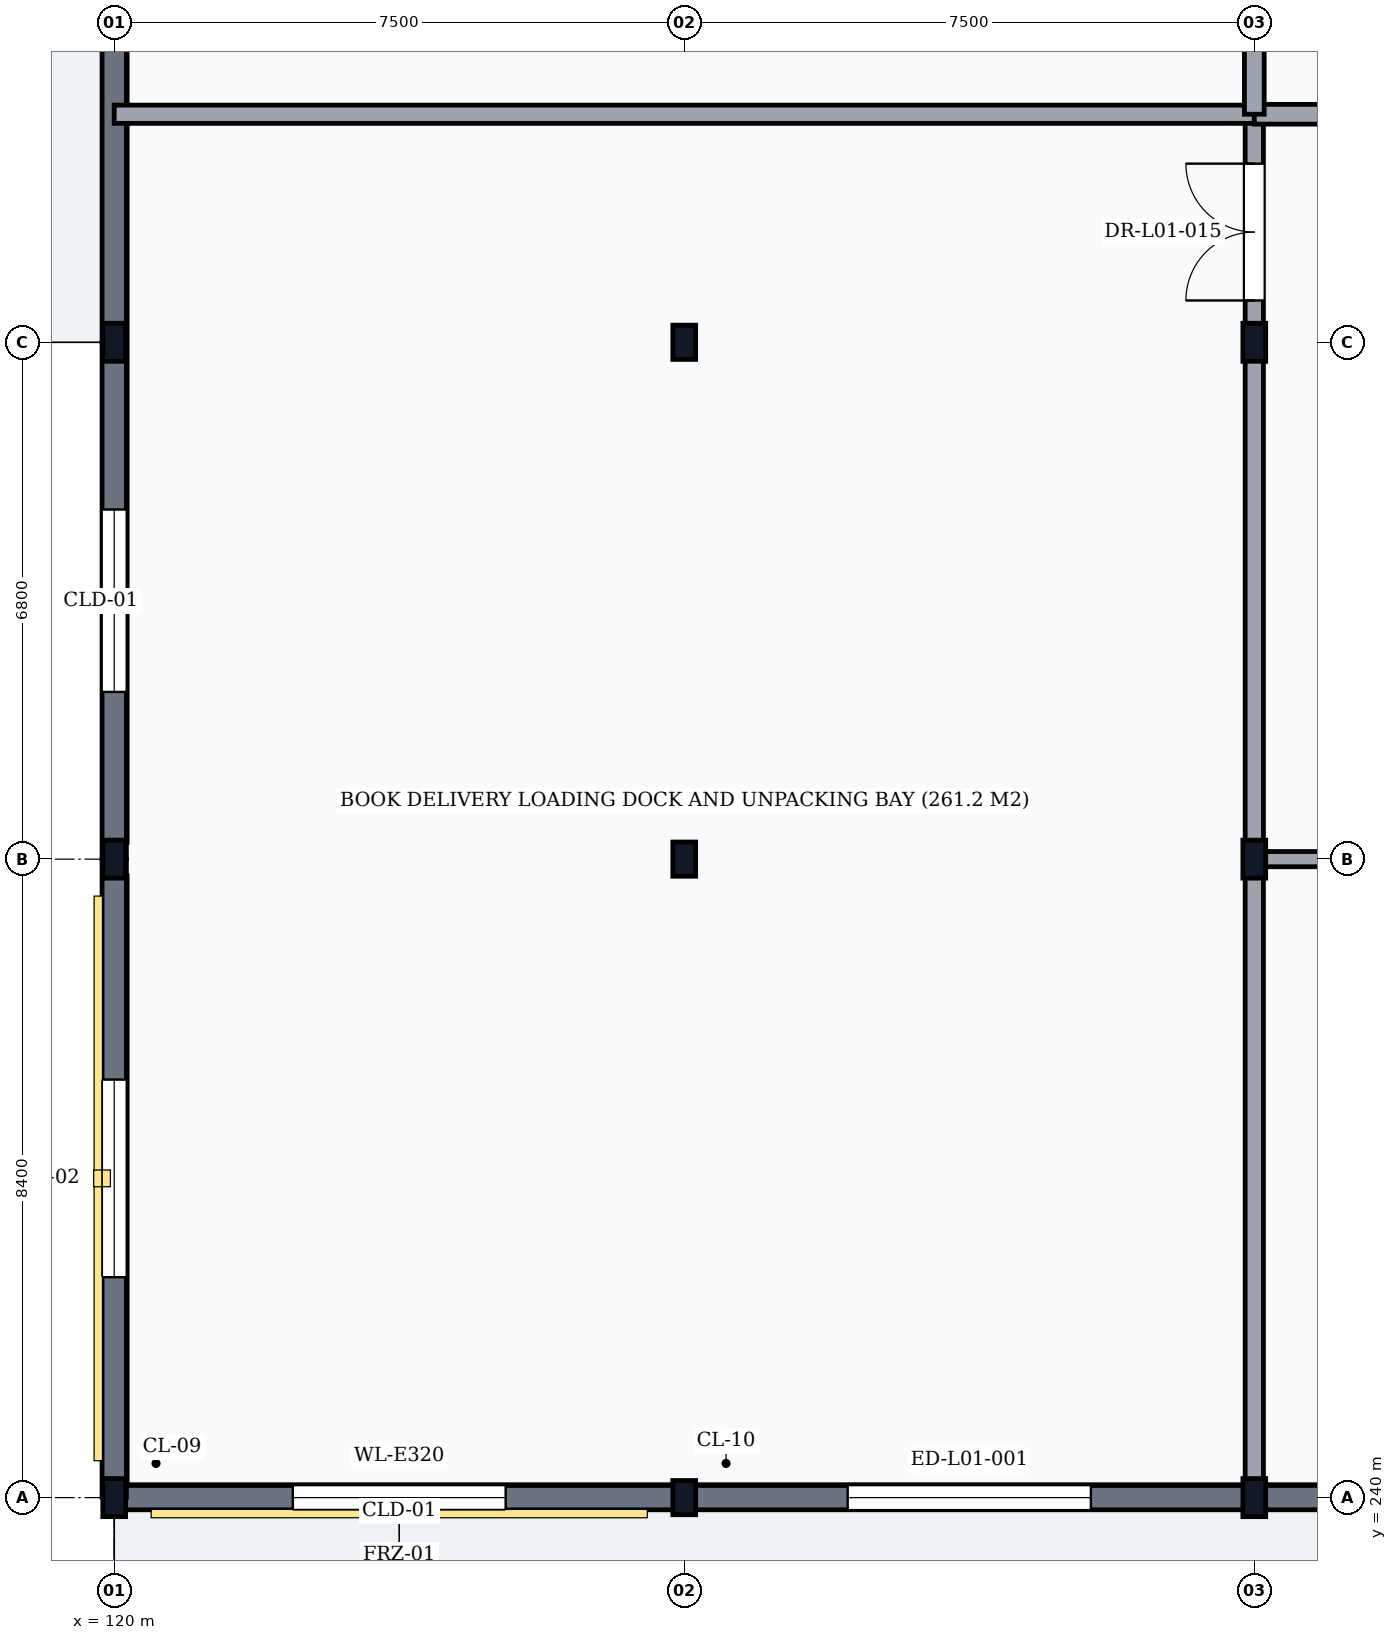
"""IFC4 building model, lengths in metres.
Left out: names, types, materials, properties, quantities, classifications, styles, units other than length and angle.
Written with IfcOpenShell. Run it as: python <this file> out.ifc"""

import sys

from ifc_helpers import new_model, si_unit, direction, frame, frame_2d, origin, origin_2d, place, context, subcontext, project, spatial, rectangle, i_section, extrude, element, fill, save


model = new_model("IFC4")
c1 = context("Model", 3, precision=1e-05, world=origin(), true_north=direction((0.0, 1.0)))
c2 = subcontext(c1, "Body", "Model", "MODEL_VIEW")
j1 = project(units=[si_unit("LENGTHUNIT", "METRE"), si_unit("PLANEANGLEUNIT", "RADIAN")], contexts=[c1])
p1 = place(None, origin())
s1 = spatial("IfcSite", under=j1, at=p1, CompositionType="ELEMENT")
p2 = place(p1, origin())
s2 = spatial("IfcBuilding", under=s1, at=p2, CompositionType="ELEMENT")
p3 = place(p2, origin())
s3 = spatial("IfcBuildingStorey", under=s2, at=p3, CompositionType="ELEMENT", Elevation=0.0)
for number, where, z_axis, x_axis in (
    (1, (120.0, 240.0, 0.0), (0.0, 0.0, 1.0), (1.0, 0.0, 0.0)),
    (2, (120.0, 248.4, 0.0), (0.0, 0.0, 1.0), (1.0, 0.0, 0.0)),
    (3, (120.0, 255.2, 0.0), (0.0, 0.0, 1.0), (1.0, 0.0, 0.0)),
):
    element("IfcColumn", number, at=place(p3, frame(where, z_axis=z_axis, x_axis=x_axis)), inside=s3, PredefinedType="COLUMN", context=c2, shape_type="SweptSolid", body=[
        extrude(i_section(OverallWidth=0.3, OverallDepth=0.5, WebThickness=0.014, FlangeThickness=0.028, FilletRadius=0.027, at=origin_2d()), origin(), (0.0, 0.0, 1.0), 5.4),
    ])
for number, where, z_axis, x_axis in (
    (4, (127.5, 240.0, 0.0), (0.0, 0.0, 1.0), (1.0, 0.0, 0.0)),
    (5, (127.5, 248.4, 0.0), (0.0, 0.0, 1.0), (1.0, 0.0, 0.0)),
    (6, (127.5, 255.2, 0.0), (0.0, 0.0, 1.0), (1.0, 0.0, 0.0)),
):
    element("IfcColumn", number, at=place(p3, frame(where, z_axis=z_axis, x_axis=x_axis)), inside=s3, PredefinedType="COLUMN", context=c2, shape_type="SweptSolid", body=[
        extrude(i_section(OverallWidth=0.3, OverallDepth=0.45, WebThickness=0.014, FlangeThickness=0.026, FilletRadius=0.027, at=origin_2d()), origin(), (0.0, 0.0, 1.0), 5.4),
    ])
for number, where, z_axis, x_axis in (
    (7, (135.0, 240.0, 0.0), (0.0, 0.0, 1.0), (1.0, 0.0, 0.0)),
    (8, (135.0, 248.4, 0.0), (0.0, 0.0, 1.0), (1.0, 0.0, 0.0)),
    (9, (135.0, 255.2, 0.0), (0.0, 0.0, 1.0), (1.0, 0.0, 0.0)),
):
    element("IfcColumn", number, at=place(p3, frame(where, z_axis=z_axis, x_axis=x_axis)), inside=s3, PredefinedType="COLUMN", context=c2, shape_type="SweptSolid", body=[
        extrude(i_section(OverallWidth=0.3, OverallDepth=0.5, WebThickness=0.014, FlangeThickness=0.028, FilletRadius=0.027, at=origin_2d()), origin(), (0.0, 0.0, 1.0), 5.4),
    ])
p4 = place(p3, frame((120.006, 240.0, 0.0), z_axis=(0.0, 0.0, 1.0), x_axis=(1.0, 0.0, 0.0)))
e10 = element("IfcWall", 10, at=p4, inside=s3, PredefinedType="SOLIDWALL", context=c2, shape_type="SweptSolid", body=[
    extrude(rectangle(XDim=7.488, YDim=0.32, at=frame_2d((3.744, 0.0))), origin(), (0.0, 0.0, 1.0), 4.878),
])
p5 = place(p4, frame((2.344, 0.0, 0.95)))
e11 = element("IfcOpeningElement", 11, at=p5, cuts=e10, PredefinedType="OPENING", context=c2, shape_type="SweptSolid", body=[
    extrude(rectangle(XDim=2.8, YDim=3.2, at=frame_2d((1.4, 1.6))), frame((0.0, 0.175, 0.0), z_axis=(0.0, -1.0, 0.0), x_axis=(1.0, 0.0, 0.0)), (0.0, 0.0, 1.0), 0.35),
])
p6 = place(p3, frame((127.506, 240.0, 0.0), z_axis=(0.0, 0.0, 1.0), x_axis=(1.0, 0.0, 0.0)))
e12 = element("IfcWall", 12, at=p6, inside=s3, PredefinedType="SOLIDWALL", context=c2, shape_type="SweptSolid", body=[
    extrude(rectangle(XDim=7.488, YDim=0.32, at=frame_2d((3.744, 0.0))), origin(), (0.0, 0.0, 1.0), 4.878),
])
p7 = place(p6, frame((2.144, 0.0, 0.0)))
e13 = element("IfcOpeningElement", 13, at=p7, cuts=e12, PredefinedType="OPENING", context=c2, shape_type="SweptSolid", body=[
    extrude(rectangle(XDim=3.2, YDim=3.0, at=frame_2d((1.6, 1.5))), frame((0.0, 0.175, 0.0), z_axis=(0.0, -1.0, 0.0), x_axis=(1.0, 0.0, 0.0)), (0.0, 0.0, 1.0), 0.35),
])
p8 = place(p3, frame((135.006, 240.0, 0.0), z_axis=(0.0, 0.0, 1.0), x_axis=(1.0, 0.0, 0.0)))
e14 = element("IfcWall", 14, at=p8, inside=s3, PredefinedType="SOLIDWALL", context=c2, shape_type="SweptSolid", body=[
    extrude(rectangle(XDim=7.488, YDim=0.32, at=frame_2d((3.744, 0.0))), origin(), (0.0, 0.0, 1.0), 4.878),
])
p9 = place(p8, frame((2.544, 0.0, 0.95)))
e15 = element("IfcOpeningElement", 15, at=p9, cuts=e14, PredefinedType="OPENING", context=c2, shape_type="SweptSolid", body=[
    extrude(rectangle(XDim=2.4, YDim=2.8, at=frame_2d((1.2, 1.4))), frame((0.0, 0.175, 0.0), z_axis=(0.0, -1.0, 0.0), x_axis=(1.0, 0.0, 0.0)), (0.0, 0.0, 1.0), 0.35),
])
p10 = place(p3, frame((120.0, 240.006, 0.0), z_axis=(0.0, 0.0, 1.0), x_axis=(0.0, 1.0, 0.0)))
e16 = element("IfcWall", 16, at=p10, inside=s3, PredefinedType="SOLIDWALL", context=c2, shape_type="SweptSolid", body=[
    extrude(rectangle(XDim=8.388, YDim=0.32, at=frame_2d((4.194, 0.0))), origin(), (0.0, 0.0, 1.0), 4.838),
])
p11 = place(p10, frame((2.894, 0.0, 0.95)))
e17 = element("IfcOpeningElement", 17, at=p11, cuts=e16, PredefinedType="OPENING", context=c2, shape_type="SweptSolid", body=[
    extrude(rectangle(XDim=2.6, YDim=3.0, at=frame_2d((1.3, 1.5))), frame((0.0, 0.175, 0.0), z_axis=(0.0, -1.0, 0.0), x_axis=(1.0, 0.0, 0.0)), (0.0, 0.0, 1.0), 0.35),
])
p12 = place(p3, frame((120.0, 248.406, 0.0), z_axis=(0.0, 0.0, 1.0), x_axis=(0.0, 1.0, 0.0)))
e18 = element("IfcWall", 18, at=p12, inside=s3, PredefinedType="SOLIDWALL", context=c2, shape_type="SweptSolid", body=[
    extrude(rectangle(XDim=6.788, YDim=0.32, at=frame_2d((3.394, 0.0))), origin(), (0.0, 0.0, 1.0), 4.918),
])
p13 = place(p12, frame((2.194, 0.0, 0.95)))
e19 = element("IfcOpeningElement", 19, at=p13, cuts=e18, PredefinedType="OPENING", context=c2, shape_type="SweptSolid", body=[
    extrude(rectangle(XDim=2.4, YDim=2.8, at=frame_2d((1.2, 1.4))), frame((0.0, 0.175, 0.0), z_axis=(0.0, -1.0, 0.0), x_axis=(1.0, 0.0, 0.0)), (0.0, 0.0, 1.0), 0.35),
])
p14 = place(p3, frame((120.0, 255.206, 0.0), z_axis=(0.0, 0.0, 1.0), x_axis=(0.0, 1.0, 0.0)))
e20 = element("IfcWall", 20, at=p14, inside=s3, PredefinedType="SOLIDWALL", context=c2, shape_type="SweptSolid", body=[
    extrude(rectangle(XDim=7.588, YDim=0.32, at=frame_2d((3.794, 0.0))), origin(), (0.0, 0.0, 1.0), 4.878),
])
p15 = place(p14, frame((3.966, 0.0, 0.95)))
e21 = element("IfcOpeningElement", 21, at=p15, cuts=e20, PredefinedType="OPENING", context=c2, shape_type="SweptSolid", body=[
    extrude(rectangle(XDim=2.2, YDim=2.8, at=frame_2d((1.1, 1.4))), frame((0.0, 0.175, 0.0), z_axis=(0.0, -1.0, 0.0), x_axis=(1.0, 0.0, 0.0)), (0.0, 0.0, 1.0), 0.35),
])
p16 = place(p3, frame((120.1, 240.1, 5.4), z_axis=(0.0, 0.0, 1.0), x_axis=(1.0, 0.0, 0.0)))
e22 = element("IfcWall", 22, at=p16, inside=s3, PredefinedType="PARAPET", context=c2, shape_type="SweptSolid", body=[
    extrude(rectangle(XDim=167.8, YDim=0.18, at=frame_2d((83.9, 0.0))), origin(), (0.0, 0.0, 1.0), 1.2),
])
p17 = place(p3, frame((120.1, 240.2, 5.4), z_axis=(0.0, 0.0, 1.0), x_axis=(0.0, 1.0, 0.0)))
e23 = element("IfcWall", 23, at=p17, inside=s3, PredefinedType="PARAPET", context=c2, shape_type="SweptSolid", body=[
    extrude(rectangle(XDim=8.0, YDim=0.18, at=frame_2d((4.0, 0.0))), origin(), (0.0, 0.0, 1.0), 1.2),
])
p18 = place(p3, frame((120.1, 248.6, 5.4), z_axis=(0.0, 0.0, 1.0), x_axis=(0.0, 1.0, 0.0)))
e24 = element("IfcWall", 24, at=p18, inside=s3, PredefinedType="PARAPET", context=c2, shape_type="SweptSolid", body=[
    extrude(rectangle(XDim=105.2, YDim=0.18, at=frame_2d((52.6, 0.0))), origin(), (0.0, 0.0, 1.0), 1.2),
])
p19 = place(p3, frame((135.0, 240.0, 0.0), z_axis=(0.0, 0.0, 1.0), x_axis=(0.0, 1.0, 0.0)))
e25 = element("IfcWall", 25, at=p19, inside=s3, PredefinedType="PARTITIONING", context=c2, shape_type="SweptSolid", body=[
    extrude(rectangle(XDim=18.2, YDim=0.24, at=frame_2d((9.1, 0.0))), origin(), (0.0, 0.0, 1.0), 4.688),
])
p20 = place(p19, frame((15.75, 0.0, 0.0)))
e26 = element("IfcOpeningElement", 26, at=p20, cuts=e25, PredefinedType="OPENING", context=c2, shape_type="SweptSolid", body=[
    extrude(rectangle(XDim=1.8, YDim=2.25, at=frame_2d((0.9, 1.125))), frame((0.0, 0.135, 0.0), z_axis=(0.0, -1.0, 0.0), x_axis=(1.0, 0.0, 0.0)), (0.0, 0.0, 1.0), 0.27),
])
p21 = place(p3, frame((120.0, 258.2, 0.0), z_axis=(0.0, 0.0, 1.0), x_axis=(1.0, 0.0, 0.0)))
e27 = element("IfcWall", 27, at=p21, inside=s3, PredefinedType="PARTITIONING", context=c2, shape_type="SweptSolid", body=[
    extrude(rectangle(XDim=15.0, YDim=0.24, at=frame_2d((7.5, 0.0))), origin(), (0.0, 0.0, 1.0), 5.14),
])
p22 = place(p3, frame((135.0, 248.4, 0.0), z_axis=(0.0, 0.0, 1.0), x_axis=(1.0, 0.0, 0.0)))
e28 = element("IfcWall", 28, at=p22, inside=s3, PredefinedType="PARTITIONING", context=c2, shape_type="SweptSolid", body=[
    extrude(rectangle(XDim=15.0, YDim=0.2, at=frame_2d((7.5, 0.0))), origin(), (0.0, 0.0, 1.0), 4.778),
])
p23 = place(p22, frame((8.04, 0.0, 0.0)))
e29 = element("IfcOpeningElement", 29, at=p23, cuts=e28, PredefinedType="OPENING", context=c2, shape_type="SweptSolid", body=[
    extrude(rectangle(XDim=1.6, YDim=2.25, at=frame_2d((0.8, 1.125))), frame((0.0, 0.115, 0.0), z_axis=(0.0, -1.0, 0.0), x_axis=(1.0, 0.0, 0.0)), (0.0, 0.0, 1.0), 0.23),
])
p24 = place(p3, frame((135.0, 258.2, 0.0), z_axis=(0.0, 0.0, 1.0), x_axis=(1.0, 0.0, 0.0)))
e30 = element("IfcWall", 30, at=p24, inside=s3, PredefinedType="PARTITIONING", context=c2, shape_type="SweptSolid", body=[
    extrude(rectangle(XDim=30.0, YDim=0.26, at=frame_2d((15.0, 0.0))), origin(), (0.0, 0.0, 1.0), 5.14),
])
p25 = place(p24, frame((5.16, 0.0, 0.0)))
e31 = element("IfcOpeningElement", 31, at=p25, cuts=e30, PredefinedType="OPENING", context=c2, shape_type="SweptSolid", body=[
    extrude(rectangle(XDim=1.8, YDim=2.4, at=frame_2d((0.9, 1.2))), frame((0.0, 0.145, 0.0), z_axis=(0.0, -1.0, 0.0), x_axis=(1.0, 0.0, 0.0)), (0.0, 0.0, 1.0), 0.29),
])
p26 = place(p24, frame((25.35, 0.0, 0.0)))
e32 = element("IfcOpeningElement", 32, at=p26, cuts=e30, PredefinedType="OPENING", context=c2, shape_type="SweptSolid", body=[
    extrude(rectangle(XDim=1.8, YDim=2.4, at=frame_2d((0.9, 1.2))), frame((0.0, 0.145, 0.0), z_axis=(0.0, -1.0, 0.0), x_axis=(1.0, 0.0, 0.0)), (0.0, 0.0, 1.0), 0.29),
])
p27 = place(p3, frame((135.0, 258.2, 0.0), z_axis=(0.0, 0.0, 1.0), x_axis=(0.0, 1.0, 0.0)))
e33 = element("IfcWall", 33, at=p27, inside=s3, PredefinedType="PARTITIONING", context=c2, shape_type="SweptSolid", body=[
    extrude(rectangle(XDim=42.6, YDim=0.26, at=frame_2d((21.3, 0.0))), origin(), (0.0, 0.0, 1.0), 4.778),
])
p28 = place(p27, frame((9.1, 0.0, 0.0)))
e34 = element("IfcOpeningElement", 34, at=p28, cuts=e33, PredefinedType="OPENING", context=c2, shape_type="SweptSolid", body=[
    extrude(rectangle(XDim=1.8, YDim=2.4, at=frame_2d((0.9, 1.2))), frame((0.0, 0.145, 0.0), z_axis=(0.0, -1.0, 0.0), x_axis=(1.0, 0.0, 0.0)), (0.0, 0.0, 1.0), 0.29),
])
p29 = place(p5, origin())
e35 = element("IfcWindow", 35, at=p29, inside=s3, PartitioningType="DOUBLE_PANEL_VERTICAL", PredefinedType="WINDOW", context=c2, shape_type="SweptSolid", body=[
    extrude(rectangle(XDim=2.8, YDim=3.2, at=frame_2d((1.4, 1.6))), frame((0.0, 0.03, 0.0), z_axis=(0.0, -1.0, 0.0), x_axis=(1.0, 0.0, 0.0)), (0.0, 0.0, 1.0), 0.06),
])
fill(e11, e35)
p30 = place(p7, frame((3.2, 0.0, 0.0), z_axis=(0.0, 0.0, 1.0), x_axis=(-1.0, 0.0, 0.0)))
e36 = element("IfcDoor", 36, at=p30, inside=s3, OperationType="ROLLINGUP", PredefinedType="DOOR", context=c2, shape_type="SweptSolid", body=[
    extrude(rectangle(XDim=3.2, YDim=3.0, at=frame_2d((1.6, 1.5))), frame((0.0, 0.025, 0.0), z_axis=(0.0, -1.0, 0.0), x_axis=(1.0, 0.0, 0.0)), (0.0, 0.0, 1.0), 0.05),
])
fill(e13, e36)
p31 = place(p11, origin())
e37 = element("IfcWindow", 37, at=p31, inside=s3, PartitioningType="DOUBLE_PANEL_VERTICAL", PredefinedType="WINDOW", context=c2, shape_type="SweptSolid", body=[
    extrude(rectangle(XDim=2.6, YDim=3.0, at=frame_2d((1.3, 1.5))), frame((0.0, 0.03, 0.0), z_axis=(0.0, -1.0, 0.0), x_axis=(1.0, 0.0, 0.0)), (0.0, 0.0, 1.0), 0.06),
])
fill(e17, e37)
p32 = place(p13, origin())
e38 = element("IfcWindow", 38, at=p32, inside=s3, PartitioningType="DOUBLE_PANEL_VERTICAL", PredefinedType="WINDOW", context=c2, shape_type="SweptSolid", body=[
    extrude(rectangle(XDim=2.4, YDim=2.8, at=frame_2d((1.2, 1.4))), frame((0.0, 0.03, 0.0), z_axis=(0.0, -1.0, 0.0), x_axis=(1.0, 0.0, 0.0)), (0.0, 0.0, 1.0), 0.06),
])
fill(e19, e38)
p33 = place(p20, origin())
e39 = element("IfcDoor", 39, at=p33, inside=s3, OperationType="DOUBLE_DOOR_SINGLE_SWING", PredefinedType="DOOR", context=c2, shape_type="SweptSolid", body=[
    extrude(rectangle(XDim=1.8, YDim=2.25, at=frame_2d((0.9, 1.125))), frame((0.0, 0.025, 0.0), z_axis=(0.0, -1.0, 0.0), x_axis=(1.0, 0.0, 0.0)), (0.0, 0.0, 1.0), 0.05),
])
fill(e26, e39)
save(model, sys.argv[1])
